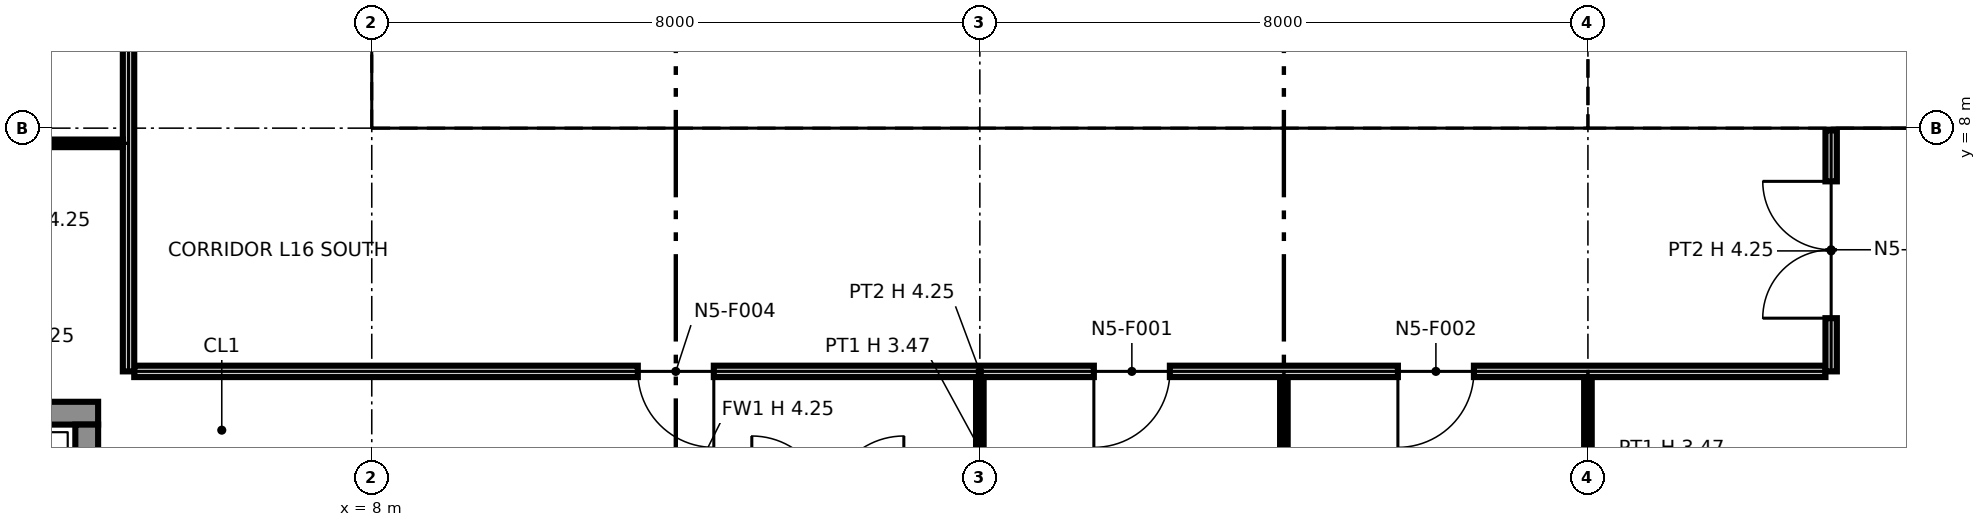
"""IFC4 building model, lengths in metres.
Left out: names, types, materials, properties, quantities, classifications, styles, units other than length and angle.
Written with IfcOpenShell. Run it as: python <this file> out.ifc"""

import sys

from ifc_helpers import new_model, si_unit, direction, frame, frame_2d, origin, origin_2d, place, context, subcontext, project, spatial, polyline, rectangle, i_section, outline, extrude, element, fill, save


model = new_model("IFC4")
c1 = context("Model", 3, precision=1e-05, world=origin(), true_north=direction((0.0, 1.0)))
c2 = subcontext(c1, "Body", "Model", "MODEL_VIEW")
j1 = project(units=[si_unit("LENGTHUNIT", "METRE"), si_unit("PLANEANGLEUNIT", "RADIAN")], contexts=[c1])
p1 = place(None, origin())
s1 = spatial("IfcSite", under=j1, at=p1, CompositionType="ELEMENT")
p2 = place(p1, origin())
s2 = spatial("IfcBuilding", under=s1, at=p2, CompositionType="ELEMENT")
p3 = place(p2, frame((0.0, 0.0, 87.6)))
s3 = spatial("IfcBuildingStorey", under=s2, at=p3, CompositionType="ELEMENT", Elevation=87.6)
for number, where, z_axis, x_axis in (
    (1, (8.0, 8.0, 0.0), (0.0, 0.0, 1.0), (1.0, 0.0, 0.0)),
    (2, (16.0, 8.0, 0.0), (0.0, 0.0, 1.0), (1.0, 0.0, 0.0)),
):
    element("IfcColumn", number, at=place(p3, frame(where, z_axis=z_axis, x_axis=x_axis)), inside=s3, PredefinedType="COLUMN", context=c2, shape_type="SweptSolid", body=[
        extrude(i_section(OverallWidth=0.406, OverallDepth=0.417, WebThickness=0.03, FlangeThickness=0.048, at=origin_2d()), origin(), (0.0, 0.0, 1.0), 4.25),
    ])
p4 = place(p3, frame((24.0, 8.0, 0.0), z_axis=(0.0, 0.0, 1.0), x_axis=(1.0, 0.0, 0.0)))
e3 = element("IfcColumn", 3, at=p4, inside=s3, PredefinedType="COLUMN", context=c2, shape_type="SweptSolid", body=[
    extrude(i_section(OverallWidth=0.411, OverallDepth=0.434, WebThickness=0.036, FlangeThickness=0.057, at=origin_2d()), origin(), (0.0, 0.0, 1.0), 4.25),
])
p5 = place(p3, frame((2.1, 4.25, 0.0), z_axis=(0.0, 0.0, 1.0), x_axis=(1.0, 0.0, 0.0)))
e4 = element("IfcWall", 4, at=p5, inside=s3, PredefinedType="SOLIDWALL", context=c2, shape_type="SweptSolid", body=[
    extrude(rectangle(XDim=2.3, YDim=0.3, at=frame_2d((1.15, 0.0))), origin(), (0.0, 0.0, 1.0), 4.25),
])
p6 = place(p3, frame((4.25, 4.1, 0.0), z_axis=(0.0, 0.0, 1.0), x_axis=(0.0, -1.0, 0.0)))
e5 = element("IfcWall", 5, at=p6, inside=s3, PredefinedType="SOLIDWALL", context=c2, shape_type="SweptSolid", body=[
    extrude(rectangle(XDim=1.7, YDim=0.3, at=frame_2d((0.85, 0.0))), origin(), (0.0, 0.0, 1.0), 4.25),
])
p7 = place(p3, frame((8.65, 8.75, 0.0), z_axis=(0.0, 0.0, 1.0), x_axis=(1.0, 0.0, 0.0)))
e6 = element("IfcWall", 6, at=p7, inside=s3, PredefinedType="PARTITIONING", context=c2, shape_type="SweptSolid", body=[
    extrude(outline(polyline([(0.0, 0.0), (14.7, 0.0), (14.7, 4.25), (7.469, 4.25), (7.469, 3.632), (7.231, 3.632), (7.23, 4.25), (0.0, 4.25), (0.0, 0.0)])), frame((0.0, 0.1, 0.0), z_axis=(0.0, -1.0, 0.0), x_axis=(1.0, 0.0, 0.0)), (0.0, 0.0, 1.0), 0.2),
])
p8 = place(p7, frame((1.3, 0.0, 0.0)))
e7 = element("IfcOpeningElement", 7, at=p8, cuts=e6, PredefinedType="OPENING", context=c2, shape_type="SweptSolid", body=[
    extrude(rectangle(XDim=1.4, YDim=2.1, at=frame_2d((0.7, 1.05))), frame((0.0, 0.11, 0.0), z_axis=(0.0, -1.0, 0.0), x_axis=(1.0, 0.0, 0.0)), (0.0, 0.0, 1.0), 0.22),
])
p9 = place(p7, frame((4.6, 0.0, 0.0)))
e8 = element("IfcOpeningElement", 8, at=p9, cuts=e6, PredefinedType="OPENING", context=c2, shape_type="SweptSolid", body=[
    extrude(rectangle(XDim=1.4, YDim=2.1, at=frame_2d((0.7, 1.05))), frame((0.0, 0.11, 0.0), z_axis=(0.0, -1.0, 0.0), x_axis=(1.0, 0.0, 0.0)), (0.0, 0.0, 1.0), 0.22),
])
p10 = place(p7, frame((10.4, 0.0, 0.0)))
e9 = element("IfcOpeningElement", 9, at=p10, cuts=e6, PredefinedType="OPENING", context=c2, shape_type="SweptSolid", body=[
    extrude(rectangle(XDim=1.2, YDim=2.1, at=frame_2d((0.6, 1.05))), frame((0.0, 0.11, 0.0), z_axis=(0.0, -1.0, 0.0), x_axis=(1.0, 0.0, 0.0)), (0.0, 0.0, 1.0), 0.22),
])
p11 = place(p3, frame((8.75, 8.85, 0.0), z_axis=(0.0, 0.0, 1.0), x_axis=(0.0, 1.0, 0.0)))
e10 = element("IfcWall", 10, at=p11, inside=s3, PredefinedType="PARTITIONING", context=c2, shape_type="SweptSolid", body=[
    extrude(outline(polyline([(0.0, 0.0), (14.3, 0.0), (14.3, 4.25), (10.231, 4.25), (10.23, 3.789), (10.07, 3.789), (10.069, 4.25), (7.27, 4.25), (7.269, 3.632), (7.031, 3.632), (7.031, 4.25), (0.0, 4.25), (0.0, 0.0)])), frame((0.0, 0.1, 0.0), z_axis=(0.0, -1.0, 0.0), x_axis=(1.0, 0.0, 0.0)), (0.0, 0.0, 1.0), 0.2),
])
p12 = place(p11, frame((8.3, 0.0, 0.0)))
e11 = element("IfcOpeningElement", 11, at=p12, cuts=e10, PredefinedType="OPENING", context=c2, shape_type="SweptSolid", body=[
    extrude(rectangle(XDim=1.8, YDim=2.1, at=frame_2d((0.9, 1.05))), frame((0.0, 0.11, 0.0), z_axis=(0.0, -1.0, 0.0), x_axis=(1.0, 0.0, 0.0)), (0.0, 0.0, 1.0), 0.22),
])
p13 = place(p3, frame((12.4, 8.85, 0.0), z_axis=(0.0, 0.0, 1.0), x_axis=(0.0, 1.0, 0.0)))
e12 = element("IfcWall", 12, at=p13, inside=s3, PredefinedType="PARTITIONING", context=c2, shape_type="SweptSolid", body=[
    extrude(rectangle(XDim=6.85, YDim=0.2, at=frame_2d((3.425, 0.0))), origin(), (0.0, 0.0, 1.0), 4.25),
])
p14 = place(p3, frame((15.85, 8.85, 0.0), z_axis=(0.0, 0.0, 1.0), x_axis=(0.0, 1.0, 0.0)))
e13 = element("IfcWall", 13, at=p14, inside=s3, PredefinedType="PARTITIONING", context=c2, shape_type="SweptSolid", body=[
    extrude(rectangle(XDim=1.55, YDim=0.9, at=frame_2d((0.775, 0.0))), origin(), (0.0, 0.0, 1.0), 3.632),
])
p15 = place(p14, frame((0.3, 0.0, 0.0)))
e14 = element("IfcOpeningElement", 14, at=p15, cuts=e13, PredefinedType="OPENING", context=c2, shape_type="SweptSolid", body=[
    extrude(rectangle(XDim=1.1, YDim=2.1, at=frame_2d((0.55, 1.05))), frame((0.0, 0.46, 0.0), z_axis=(0.0, -1.0, 0.0), x_axis=(1.0, 0.0, 0.0)), (0.0, 0.0, 1.0), 0.92),
])
p16 = place(p3, frame((23.25, 8.85, 0.0), z_axis=(0.0, 0.0, 1.0), x_axis=(0.0, 1.0, 0.0)))
e15 = element("IfcWall", 15, at=p16, inside=s3, PredefinedType="PARTITIONING", context=c2, shape_type="SweptSolid", body=[
    extrude(outline(polyline([(0.0, 0.0), (14.3, 0.0), (14.3, 4.25), (11.231, 4.25), (11.23, 3.789), (11.07, 3.789), (11.069, 4.25), (7.27, 4.25), (7.269, 3.632), (7.031, 3.632), (7.031, 4.25), (1.231, 4.25), (1.23, 3.789), (1.07, 3.789), (1.069, 4.25), (0.0, 4.25), (0.0, 0.0)])), frame((0.0, 0.1, 0.0), z_axis=(0.0, -1.0, 0.0), x_axis=(1.0, 0.0, 0.0)), (0.0, 0.0, 1.0), 0.2),
])
p17 = place(p16, frame((8.3, 0.0, 0.0)))
e16 = element("IfcOpeningElement", 16, at=p17, cuts=e15, PredefinedType="OPENING", context=c2, shape_type="SweptSolid", body=[
    extrude(rectangle(XDim=1.8, YDim=2.1, at=frame_2d((0.9, 1.05))), frame((0.0, 0.11, 0.0), z_axis=(0.0, -1.0, 0.0), x_axis=(1.0, 0.0, 0.0)), (0.0, 0.0, 1.0), 0.22),
])
p18 = place(p3, frame((24.65, 8.75, 0.0), z_axis=(0.0, 0.0, 1.0), x_axis=(1.0, 0.0, 0.0)))
e17 = element("IfcWall", 17, at=p18, inside=s3, PredefinedType="PARTITIONING", context=c2, shape_type="SweptSolid", body=[
    extrude(outline(polyline([(0.0, 0.0), (14.7, 0.0), (14.7, 4.25), (7.469, 4.25), (7.469, 3.632), (7.231, 3.632), (7.23, 4.25), (0.0, 4.25), (0.0, 0.0)])), frame((0.0, 0.1, 0.0), z_axis=(0.0, -1.0, 0.0), x_axis=(1.0, 0.0, 0.0)), (0.0, 0.0, 1.0), 0.2),
])
p19 = place(p3, frame((24.75, 8.85, 0.0), z_axis=(0.0, 0.0, 1.0), x_axis=(0.0, 1.0, 0.0)))
e18 = element("IfcWall", 18, at=p19, inside=s3, PredefinedType="PARTITIONING", context=c2, shape_type="SweptSolid", body=[
    extrude(outline(polyline([(0.0, 0.0), (6.3, 0.0), (6.3, 4.25), (3.231, 4.25), (3.23, 3.789), (3.07, 3.789), (3.069, 4.25), (0.0, 4.25), (0.0, 0.0)])), frame((0.0, 0.1, 0.0), z_axis=(0.0, -1.0, 0.0), x_axis=(1.0, 0.0, 0.0)), (0.0, 0.0, 1.0), 0.2),
])
p20 = place(p3, frame((26.675, 8.85, 0.0), z_axis=(0.0, 0.0, 1.0), x_axis=(0.0, 1.0, 0.0)))
e19 = element("IfcWall", 19, at=p20, inside=s3, PredefinedType="PARTITIONING", context=c2, shape_type="SweptSolid", body=[
    extrude(outline(polyline([(0.0, 0.0), (4.2, 0.0), (4.2, 4.25), (3.231, 4.25), (3.23, 3.789), (3.07, 3.789), (3.069, 4.25), (0.0, 4.25), (0.0, 0.0)])), frame((0.0, 0.075, 0.0), z_axis=(0.0, -1.0, 0.0), x_axis=(1.0, 0.0, 0.0)), (0.0, 0.0, 1.0), 0.15),
])
p21 = place(p3, frame((20.0, 0.13, 0.0), z_axis=(0.0, 0.0, 1.0), x_axis=(0.0, 1.0, 0.0)))
e20 = element("IfcWall", 20, at=p21, inside=s3, PredefinedType="PARTITIONING", context=c2, shape_type="SweptSolid", body=[
    extrude(outline(polyline([(0.0, 0.0), (4.595, 0.0), (4.595, 4.25), (4.17, 4.25), (4.168, 3.47), (3.572, 3.47), (3.57, 4.25), (0.0, 4.25), (0.0, 0.0)])), frame((0.0, 0.05, 0.0), z_axis=(0.0, -1.0, 0.0), x_axis=(1.0, 0.0, 0.0)), (0.0, 0.0, 1.0), 0.1),
])
for number, where, z_axis, x_axis in (
    (21, (16.0, 2.83, 0.0), (0.0, 0.0, 1.0), (0.0, 1.0, 0.0)),
    (22, (24.0, 2.83, 0.0), (0.0, 0.0, 1.0), (0.0, 1.0, 0.0)),
):
    element("IfcWall", number, at=place(p3, frame(where, z_axis=z_axis, x_axis=x_axis)), inside=s3, PredefinedType="PARTITIONING", context=c2, shape_type="SweptSolid", body=[
        extrude(rectangle(XDim=1.895, YDim=0.1, at=frame_2d((0.948, 0.0))), origin(), (0.0, 0.0, 1.0), 3.47),
    ])
p22 = place(p3, frame((4.875, 4.8, 0.0), z_axis=(0.0, 0.0, 1.0), x_axis=(1.0, 0.0, 0.0)))
e23 = element("IfcWall", 23, at=p22, inside=s3, PredefinedType="PARTITIONING", context=c2, shape_type="SweptSolid", body=[
    extrude(rectangle(XDim=22.25, YDim=0.15, at=frame_2d((11.125, 0.0))), origin(), (0.0, 0.0, 1.0), 4.25),
])
p23 = place(p22, frame((13.625, 0.0, 0.0), z_axis=(0.0, 0.0, 1.0), x_axis=(-1.0, 0.0, 0.0)))
e24 = element("IfcOpeningElement", 24, at=p23, cuts=e23, PredefinedType="OPENING", context=c2, shape_type="SweptSolid", body=[
    extrude(rectangle(XDim=1.0, YDim=2.1, at=frame_2d((0.5, 1.05))), frame((0.0, 0.085, 0.0), z_axis=(0.0, -1.0, 0.0), x_axis=(1.0, 0.0, 0.0)), (0.0, 0.0, 1.0), 0.17),
])
p24 = place(p22, frame((17.625, 0.0, 0.0), z_axis=(0.0, 0.0, 1.0), x_axis=(-1.0, 0.0, 0.0)))
e25 = element("IfcOpeningElement", 25, at=p24, cuts=e23, PredefinedType="OPENING", context=c2, shape_type="SweptSolid", body=[
    extrude(rectangle(XDim=1.0, YDim=2.1, at=frame_2d((0.5, 1.05))), frame((0.0, 0.085, 0.0), z_axis=(0.0, -1.0, 0.0), x_axis=(1.0, 0.0, 0.0)), (0.0, 0.0, 1.0), 0.17),
])
p25 = place(p22, frame((7.625, 0.0, 0.0), z_axis=(0.0, 0.0, 1.0), x_axis=(-1.0, 0.0, 0.0)))
e26 = element("IfcOpeningElement", 26, at=p25, cuts=e23, PredefinedType="OPENING", context=c2, shape_type="SweptSolid", body=[
    extrude(rectangle(XDim=1.0, YDim=2.1, at=frame_2d((0.5, 1.05))), frame((0.0, 0.085, 0.0), z_axis=(0.0, -1.0, 0.0), x_axis=(1.0, 0.0, 0.0)), (0.0, 0.0, 1.0), 0.17),
])
p26 = place(p3, frame((4.8, 4.8, 0.0), z_axis=(0.0, 0.0, 1.0), x_axis=(0.0, 1.0, 0.0)))
e27 = element("IfcWall", 27, at=p26, inside=s3, PredefinedType="PARTITIONING", context=c2, shape_type="SweptSolid", body=[
    extrude(outline(polyline([(0.0, 0.0), (14.575, 0.0), (14.575, 4.25), (11.5, 4.25), (11.498, 3.47), (10.902, 3.47), (10.9, 4.25), (7.5, 4.25), (7.498, 3.47), (6.902, 3.47), (6.9, 4.25), (3.5, 4.25), (3.498, 3.47), (2.902, 3.47), (2.9, 4.25), (0.0, 4.25), (0.0, 0.0)])), frame((0.0, 0.075, 0.0), z_axis=(0.0, -1.0, 0.0), x_axis=(1.0, 0.0, 0.0)), (0.0, 0.0, 1.0), 0.15),
])
p27 = place(p26, frame((12.425, 0.0, 0.0)))
e28 = element("IfcOpeningElement", 28, at=p27, cuts=e27, PredefinedType="OPENING", context=c2, shape_type="SweptSolid", body=[
    extrude(rectangle(XDim=1.0, YDim=2.1, at=frame_2d((0.5, 1.05))), frame((0.0, 0.085, 0.0), z_axis=(0.0, -1.0, 0.0), x_axis=(1.0, 0.0, 0.0)), (0.0, 0.0, 1.0), 0.17),
])
p28 = place(p3, frame((27.2, 4.8, 0.0), z_axis=(0.0, 0.0, 1.0), x_axis=(0.0, 1.0, 0.0)))
e29 = element("IfcWall", 29, at=p28, inside=s3, PredefinedType="PARTITIONING", context=c2, shape_type="SweptSolid", body=[
    extrude(rectangle(XDim=3.17, YDim=0.15, at=frame_2d((1.585, 0.0))), origin(), (0.0, 0.0, 1.0), 4.25),
])
p29 = place(p28, frame((0.7, 0.0, 0.0)))
e30 = element("IfcOpeningElement", 30, at=p29, cuts=e29, PredefinedType="OPENING", context=c2, shape_type="SweptSolid", body=[
    extrude(rectangle(XDim=1.8, YDim=2.1, at=frame_2d((0.9, 1.05))), frame((0.0, 0.085, 0.0), z_axis=(0.0, -1.0, 0.0), x_axis=(1.0, 0.0, 0.0)), (0.0, 0.0, 1.0), 0.17),
])
p30 = place(p3, frame((0.43, 7.8, 0.0), z_axis=(0.0, 0.0, 1.0), x_axis=(1.0, 0.0, 0.0)))
e31 = element("IfcWall", 31, at=p30, inside=s3, PredefinedType="PARTITIONING", context=c2, shape_type="SweptSolid", body=[
    extrude(rectangle(XDim=4.295, YDim=0.1, at=frame_2d((2.147, 0.0))), origin(), (0.0, 0.0, 1.0), 4.25),
])
p31 = place(p30, frame((2.52, 0.0, 0.0), z_axis=(0.0, 0.0, 1.0), x_axis=(-1.0, 0.0, 0.0)))
e32 = element("IfcOpeningElement", 32, at=p31, cuts=e31, PredefinedType="OPENING", context=c2, shape_type="SweptSolid", body=[
    extrude(rectangle(XDim=1.0, YDim=2.1, at=frame_2d((0.5, 1.05))), frame((0.0, 0.06, 0.0), z_axis=(0.0, -1.0, 0.0), x_axis=(1.0, 0.0, 0.0)), (0.0, 0.0, 1.0), 0.12),
])
p32 = place(p8, origin())
e33 = element("IfcDoor", 33, at=p32, inside=s3, OperationType="DOUBLE_DOOR_SINGLE_SWING", PredefinedType="NOTDEFINED", context=c2, shape_type="SweptSolid", body=[
    extrude(rectangle(XDim=1.4, YDim=2.1, at=frame_2d((0.7, 1.05))), frame((0.0, 0.025, 0.0), z_axis=(0.0, -1.0, 0.0), x_axis=(1.0, 0.0, 0.0)), (0.0, 0.0, 1.0), 0.05),
])
fill(e7, e33)
p33 = place(p9, origin())
e34 = element("IfcDoor", 34, at=p33, inside=s3, OperationType="DOUBLE_DOOR_SINGLE_SWING", PredefinedType="NOTDEFINED", context=c2, shape_type="SweptSolid", body=[
    extrude(rectangle(XDim=1.4, YDim=2.1, at=frame_2d((0.7, 1.05))), frame((0.0, 0.025, 0.0), z_axis=(0.0, -1.0, 0.0), x_axis=(1.0, 0.0, 0.0)), (0.0, 0.0, 1.0), 0.05),
])
fill(e8, e34)
p34 = place(p10, origin())
e35 = element("IfcDoor", 35, at=p34, inside=s3, OperationType="SINGLE_SWING_RIGHT", PredefinedType="NOTDEFINED", context=c2, shape_type="SweptSolid", body=[
    extrude(rectangle(XDim=1.2, YDim=2.1, at=frame_2d((0.6, 1.05))), frame((0.0, 0.025, 0.0), z_axis=(0.0, -1.0, 0.0), x_axis=(1.0, 0.0, 0.0)), (0.0, 0.0, 1.0), 0.05),
])
fill(e9, e35)
p35 = place(p23, origin())
e36 = element("IfcDoor", 36, at=p35, inside=s3, OperationType="SINGLE_SWING_RIGHT", PredefinedType="DOOR", context=c2, shape_type="SweptSolid", body=[
    extrude(rectangle(XDim=1.0, YDim=2.1, at=frame_2d((0.5, 1.05))), frame((0.0, 0.025, 0.0), z_axis=(0.0, -1.0, 0.0), x_axis=(1.0, 0.0, 0.0)), (0.0, 0.0, 1.0), 0.05),
])
fill(e24, e36)
p36 = place(p24, origin())
e37 = element("IfcDoor", 37, at=p36, inside=s3, OperationType="SINGLE_SWING_RIGHT", PredefinedType="DOOR", context=c2, shape_type="SweptSolid", body=[
    extrude(rectangle(XDim=1.0, YDim=2.1, at=frame_2d((0.5, 1.05))), frame((0.0, 0.025, 0.0), z_axis=(0.0, -1.0, 0.0), x_axis=(1.0, 0.0, 0.0)), (0.0, 0.0, 1.0), 0.05),
])
fill(e25, e37)
p37 = place(p29, origin())
e38 = element("IfcDoor", 38, at=p37, inside=s3, OperationType="DOUBLE_DOOR_SINGLE_SWING", PredefinedType="DOOR", context=c2, shape_type="SweptSolid", body=[
    extrude(rectangle(XDim=1.8, YDim=2.1, at=frame_2d((0.9, 1.05))), frame((0.0, 0.025, 0.0), z_axis=(0.0, -1.0, 0.0), x_axis=(1.0, 0.0, 0.0)), (0.0, 0.0, 1.0), 0.05),
])
fill(e30, e38)
p38 = place(p25, origin())
e39 = element("IfcDoor", 39, at=p38, inside=s3, OperationType="SINGLE_SWING_LEFT", PredefinedType="DOOR", context=c2, shape_type="SweptSolid", body=[
    extrude(rectangle(XDim=1.0, YDim=2.1, at=frame_2d((0.5, 1.05))), frame((0.0, 0.025, 0.0), z_axis=(0.0, -1.0, 0.0), x_axis=(1.0, 0.0, 0.0)), (0.0, 0.0, 1.0), 0.05),
])
fill(e26, e39)
save(model, sys.argv[1])
